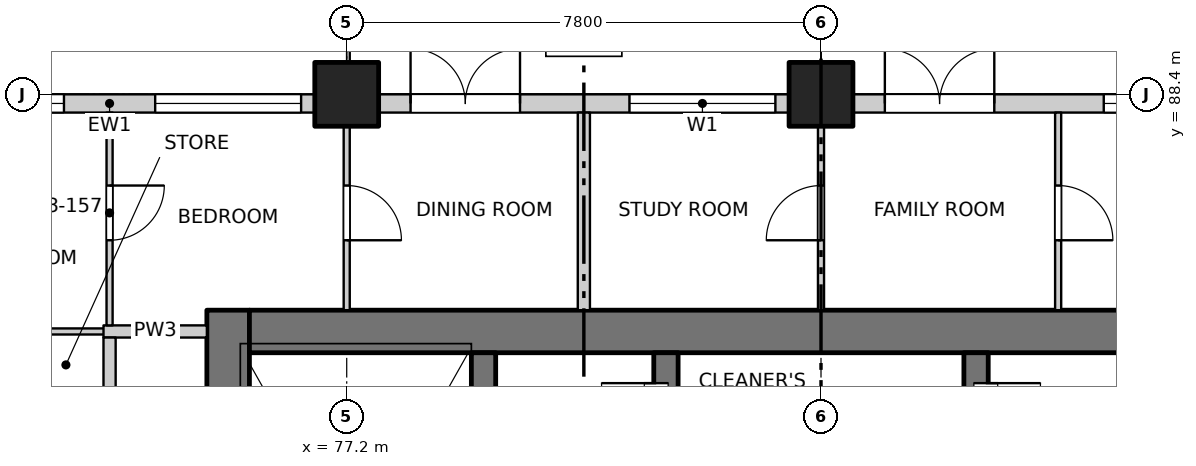
"""IFC4 building model, lengths in metres.
Left out: names, types, materials, properties, quantities, classifications, styles, units other than length and angle.
Written with IfcOpenShell. Run it as: python <this file> out.ifc"""

import sys

from ifc_helpers import new_model, si_unit, direction, frame, frame_2d, origin, origin_2d, place, context, subcontext, project, spatial, rectangle, extrude, element, fill, save


model = new_model("IFC4")
c1 = context("Model", 3, precision=1e-05, world=origin(), true_north=direction((0.0, 1.0)))
c2 = subcontext(c1, "Body", "Model", "MODEL_VIEW")
j1 = project(units=[si_unit("LENGTHUNIT", "METRE"), si_unit("PLANEANGLEUNIT", "RADIAN")], contexts=[c1])
p1 = place(None, origin())
s1 = spatial("IfcSite", under=j1, at=p1, CompositionType="ELEMENT")
p2 = place(p1, origin())
s2 = spatial("IfcBuilding", under=s1, at=p2, CompositionType="ELEMENT")
p3 = place(p2, frame((0.0, 0.0, 39.9)))
s3 = spatial("IfcBuildingStorey", under=s2, at=p3, CompositionType="ELEMENT", Elevation=39.9)
for number, where, z_axis, x_axis in (
    (1, (77.2, 88.4, -0.25), (0.0, 0.0, 1.0), (1.0, 0.0, 0.0)),
    (2, (85.0, 88.4, -0.25), (0.0, 0.0, 1.0), (1.0, 0.0, 0.0)),
):
    element("IfcColumn", number, at=place(p3, frame(where, z_axis=z_axis, x_axis=x_axis)), inside=s3, PredefinedType="COLUMN", context=c2, shape_type="SweptSolid", body=[
        extrude(rectangle(XDim=1.05, YDim=1.05, at=origin_2d()), origin(), (0.0, 0.0, 1.0), 3.4),
    ])
p4 = place(p3, frame((75.25, 77.3, -0.25), z_axis=(0.0, 0.0, 1.0), x_axis=(0.0, 1.0, 0.0)))
e3 = element("IfcWall", 3, at=p4, inside=s3, PredefinedType="SOLIDWALL", context=c2, shape_type="SweptSolid", body=[
    extrude(rectangle(XDim=7.55, YDim=0.7, at=frame_2d((3.775, 0.0))), origin(), (0.0, 0.0, 1.0), 3.4),
])
p5 = place(p4, frame((0.3, 0.0, 0.25)))
e4 = element("IfcOpeningElement", 4, at=p5, cuts=e3, PredefinedType="OPENING", context=c2, shape_type="SweptSolid", body=[
    extrude(rectangle(XDim=1.2, YDim=2.1, at=frame_2d((0.6, 1.05))), frame((0.0, 0.36, 0.0), z_axis=(0.0, -1.0, 0.0), x_axis=(1.0, 0.0, 0.0)), (0.0, 0.0, 1.0), 0.72),
])
p6 = place(p3, frame((75.6, 84.5, -0.25), z_axis=(0.0, 0.0, 1.0), x_axis=(1.0, 0.0, 0.0)))
e5 = element("IfcWall", 5, at=p6, inside=s3, PredefinedType="SOLIDWALL", context=c2, shape_type="SweptSolid", body=[
    extrude(rectangle(XDim=18.8, YDim=0.7, at=frame_2d((9.4, 0.0))), origin(), (0.0, 0.0, 1.0), 3.4),
])
p7 = place(p3, frame((79.45, 77.3, -0.25), z_axis=(0.0, 0.0, 1.0), x_axis=(0.0, 1.0, 0.0)))
e6 = element("IfcWall", 6, at=p7, inside=s3, PredefinedType="SOLIDWALL", context=c2, shape_type="SweptSolid", body=[
    extrude(rectangle(XDim=6.85, YDim=0.4, at=frame_2d((3.425, 0.0))), origin(), (0.0, 0.0, 1.0), 3.4),
])
p8 = place(p3, frame((82.45, 82.1, -0.25), z_axis=(0.0, 0.0, 1.0), x_axis=(0.0, 1.0, 0.0)))
e7 = element("IfcWall", 7, at=p8, inside=s3, PredefinedType="SOLIDWALL", context=c2, shape_type="SweptSolid", body=[
    extrude(rectangle(XDim=2.05, YDim=0.4, at=frame_2d((1.025, 0.0))), origin(), (0.0, 0.0, 1.0), 3.4),
])
p9 = place(p8, frame((0.65, 0.0, 0.25)))
e8 = element("IfcOpeningElement", 8, at=p9, cuts=e7, PredefinedType="OPENING", context=c2, shape_type="SweptSolid", body=[
    extrude(rectangle(XDim=0.9, YDim=2.1, at=frame_2d((0.45, 1.05))), frame((0.0, 0.21, 0.0), z_axis=(0.0, -1.0, 0.0), x_axis=(1.0, 0.0, 0.0)), (0.0, 0.0, 1.0), 0.42),
])
p10 = place(p3, frame((87.55, 82.1, -0.25), z_axis=(0.0, 0.0, 1.0), x_axis=(0.0, 1.0, 0.0)))
e9 = element("IfcWall", 9, at=p10, inside=s3, PredefinedType="SOLIDWALL", context=c2, shape_type="SweptSolid", body=[
    extrude(rectangle(XDim=2.05, YDim=0.4, at=frame_2d((1.025, 0.0))), origin(), (0.0, 0.0, 1.0), 3.4),
])
p11 = place(p10, frame((0.65, 0.0, 0.25)))
e10 = element("IfcOpeningElement", 10, at=p11, cuts=e9, PredefinedType="OPENING", context=c2, shape_type="SweptSolid", body=[
    extrude(rectangle(XDim=0.9, YDim=2.1, at=frame_2d((0.45, 1.05))), frame((0.0, 0.21, 0.0), z_axis=(0.0, -1.0, 0.0), x_axis=(1.0, 0.0, 0.0)), (0.0, 0.0, 1.0), 0.42),
])
p12 = place(p3, frame((69.925, 88.25, 0.0), z_axis=(0.0, 0.0, 1.0), x_axis=(1.0, 0.0, 0.0)))
e11 = element("IfcWall", 11, at=p12, inside=s3, PredefinedType="SOLIDWALL", context=c2, shape_type="SweptSolid", body=[
    extrude(rectangle(XDim=6.75, YDim=0.3, at=frame_2d((3.375, 0.0))), origin(), (0.0, 0.0, 1.0), 2.7),
])
p13 = place(p12, frame((0.225, 0.0, 0.9)))
e12 = element("IfcOpeningElement", 12, at=p13, cuts=e11, PredefinedType="OPENING", context=c2, shape_type="SweptSolid", body=[
    extrude(rectangle(XDim=2.4, YDim=1.8, at=frame_2d((1.2, 0.9))), frame((0.0, 0.16, 0.0), z_axis=(0.0, -1.0, 0.0), x_axis=(1.0, 0.0, 0.0)), (0.0, 0.0, 1.0), 0.32),
])
p14 = place(p12, frame((4.125, 0.0, 0.9)))
e13 = element("IfcOpeningElement", 13, at=p14, cuts=e11, PredefinedType="OPENING", context=c2, shape_type="SweptSolid", body=[
    extrude(rectangle(XDim=2.4, YDim=1.8, at=frame_2d((1.2, 0.9))), frame((0.0, 0.16, 0.0), z_axis=(0.0, -1.0, 0.0), x_axis=(1.0, 0.0, 0.0)), (0.0, 0.0, 1.0), 0.32),
])
p15 = place(p3, frame((77.725, 88.25, 0.0), z_axis=(0.0, 0.0, 1.0), x_axis=(1.0, 0.0, 0.0)))
e14 = element("IfcWall", 14, at=p15, inside=s3, PredefinedType="SOLIDWALL", context=c2, shape_type="SweptSolid", body=[
    extrude(rectangle(XDim=6.75, YDim=0.3, at=frame_2d((3.375, 0.0))), origin(), (0.0, 0.0, 1.0), 2.7),
])
p16 = place(p15, frame((0.525, 0.0, 0.0)))
e15 = element("IfcOpeningElement", 15, at=p16, cuts=e14, PredefinedType="OPENING", context=c2, shape_type="SweptSolid", body=[
    extrude(rectangle(XDim=1.8, YDim=2.4, at=frame_2d((0.9, 1.2))), frame((0.0, 0.16, 0.0), z_axis=(0.0, -1.0, 0.0), x_axis=(1.0, 0.0, 0.0)), (0.0, 0.0, 1.0), 0.32),
])
p17 = place(p15, frame((4.125, 0.0, 0.9)))
e16 = element("IfcOpeningElement", 16, at=p17, cuts=e14, PredefinedType="OPENING", context=c2, shape_type="SweptSolid", body=[
    extrude(rectangle(XDim=2.4, YDim=1.8, at=frame_2d((1.2, 0.9))), frame((0.0, 0.16, 0.0), z_axis=(0.0, -1.0, 0.0), x_axis=(1.0, 0.0, 0.0)), (0.0, 0.0, 1.0), 0.32),
])
p18 = place(p3, frame((85.525, 88.25, 0.0), z_axis=(0.0, 0.0, 1.0), x_axis=(1.0, 0.0, 0.0)))
e17 = element("IfcWall", 17, at=p18, inside=s3, PredefinedType="SOLIDWALL", context=c2, shape_type="SweptSolid", body=[
    extrude(rectangle(XDim=6.75, YDim=0.3, at=frame_2d((3.375, 0.0))), origin(), (0.0, 0.0, 1.0), 2.7),
])
p19 = place(p18, frame((0.525, 0.0, 0.0)))
e18 = element("IfcOpeningElement", 18, at=p19, cuts=e17, PredefinedType="OPENING", context=c2, shape_type="SweptSolid", body=[
    extrude(rectangle(XDim=1.8, YDim=2.4, at=frame_2d((0.9, 1.2))), frame((0.0, 0.16, 0.0), z_axis=(0.0, -1.0, 0.0), x_axis=(1.0, 0.0, 0.0)), (0.0, 0.0, 1.0), 0.32),
])
p20 = place(p18, frame((4.125, 0.0, 0.9)))
e19 = element("IfcOpeningElement", 19, at=p20, cuts=e17, PredefinedType="OPENING", context=c2, shape_type="SweptSolid", body=[
    extrude(rectangle(XDim=2.4, YDim=1.8, at=frame_2d((1.2, 0.9))), frame((0.0, 0.16, 0.0), z_axis=(0.0, -1.0, 0.0), x_axis=(1.0, 0.0, 0.0)), (0.0, 0.0, 1.0), 0.32),
])
p21 = place(p3, frame((61.9, 84.5, 0.0), z_axis=(0.0, 0.0, 1.0), x_axis=(1.0, 0.0, 0.0)))
e20 = element("IfcWall", 20, at=p21, inside=s3, PredefinedType="PARTITIONING", context=c2, shape_type="SweptSolid", body=[
    extrude(rectangle(XDim=11.5, YDim=0.1, at=frame_2d((5.75, 0.0))), origin(), (0.0, 0.0, 1.0), 3.15),
])
p22 = place(p21, frame((7.965, 0.0, 0.0)))
e21 = element("IfcOpeningElement", 21, at=p22, cuts=e20, PredefinedType="OPENING", context=c2, shape_type="SweptSolid", body=[
    extrude(rectangle(XDim=0.9, YDim=2.1, at=frame_2d((0.45, 1.05))), frame((0.0, 0.06, 0.0), z_axis=(0.0, -1.0, 0.0), x_axis=(1.0, 0.0, 0.0)), (0.0, 0.0, 1.0), 0.12),
])
p23 = place(p3, frame((73.2, 84.5, 0.0), z_axis=(0.0, 0.0, 1.0), x_axis=(1.0, 0.0, 0.0)))
e22 = element("IfcWall", 22, at=p23, inside=s3, PredefinedType="PARTITIONING", context=c2, shape_type="SweptSolid", body=[
    extrude(rectangle(XDim=1.7, YDim=0.2, at=frame_2d((0.85, 0.0))), origin(), (0.0, 0.0, 1.0), 3.15),
])
p24 = place(p3, frame((73.3, 53.4, 0.0), z_axis=(0.0, 0.0, 1.0), x_axis=(0.0, 1.0, 0.0)))
e23 = element("IfcWall", 23, at=p24, inside=s3, PredefinedType="PARTITIONING", context=c2, shape_type="SweptSolid", body=[
    extrude(rectangle(XDim=31.0, YDim=0.2, at=frame_2d((15.5, 0.0))), origin(), (0.0, 0.0, 1.0), 3.15),
])
p25 = place(p24, frame((5.775, 0.0, 0.0)))
e24 = element("IfcOpeningElement", 24, at=p25, cuts=e23, PredefinedType="OPENING", context=c2, shape_type="SweptSolid", body=[
    extrude(rectangle(XDim=1.0, YDim=2.1, at=frame_2d((0.5, 1.05))), frame((0.0, 0.11, 0.0), z_axis=(0.0, -1.0, 0.0), x_axis=(1.0, 0.0, 0.0)), (0.0, 0.0, 1.0), 0.22),
])
p26 = place(p24, frame((10.875, 0.0, 0.0)))
e25 = element("IfcOpeningElement", 25, at=p26, cuts=e23, PredefinedType="OPENING", context=c2, shape_type="SweptSolid", body=[
    extrude(rectangle(XDim=1.0, YDim=2.1, at=frame_2d((0.5, 1.05))), frame((0.0, 0.11, 0.0), z_axis=(0.0, -1.0, 0.0), x_axis=(1.0, 0.0, 0.0)), (0.0, 0.0, 1.0), 0.22),
])
p27 = place(p24, frame((18.025, 0.0, 0.0)))
e26 = element("IfcOpeningElement", 26, at=p27, cuts=e23, PredefinedType="OPENING", context=c2, shape_type="SweptSolid", body=[
    extrude(rectangle(XDim=1.0, YDim=2.1, at=frame_2d((0.5, 1.05))), frame((0.0, 0.11, 0.0), z_axis=(0.0, -1.0, 0.0), x_axis=(1.0, 0.0, 0.0)), (0.0, 0.0, 1.0), 0.22),
])
p28 = place(p24, frame((27.725, 0.0, 0.0)))
e27 = element("IfcOpeningElement", 27, at=p28, cuts=e23, PredefinedType="OPENING", context=c2, shape_type="SweptSolid", body=[
    extrude(rectangle(XDim=1.0, YDim=2.1, at=frame_2d((0.5, 1.05))), frame((0.0, 0.11, 0.0), z_axis=(0.0, -1.0, 0.0), x_axis=(1.0, 0.0, 0.0)), (0.0, 0.0, 1.0), 0.22),
])
p29 = place(p3, frame((73.3, 84.6, 0.0), z_axis=(0.0, 0.0, 1.0), x_axis=(0.0, 1.0, 0.0)))
e28 = element("IfcWall", 28, at=p29, inside=s3, PredefinedType="PARTITIONING", context=c2, shape_type="SweptSolid", body=[
    extrude(rectangle(XDim=3.5, YDim=0.1, at=frame_2d((1.75, 0.0))), origin(), (0.0, 0.0, 1.0), 3.15),
])
p30 = place(p29, frame((1.4, 0.0, 0.0)))
e29 = element("IfcOpeningElement", 29, at=p30, cuts=e28, PredefinedType="OPENING", context=c2, shape_type="SweptSolid", body=[
    extrude(rectangle(XDim=0.9, YDim=2.1, at=frame_2d((0.45, 1.05))), frame((0.0, 0.06, 0.0), z_axis=(0.0, -1.0, 0.0), x_axis=(1.0, 0.0, 0.0)), (0.0, 0.0, 1.0), 0.12),
])
p31 = place(p3, frame((77.2, 84.85, 0.0), z_axis=(0.0, 0.0, 1.0), x_axis=(0.0, 1.0, 0.0)))
e30 = element("IfcWall", 30, at=p31, inside=s3, PredefinedType="PARTITIONING", context=c2, shape_type="SweptSolid", body=[
    extrude(rectangle(XDim=3.25, YDim=0.1, at=frame_2d((1.625, 0.0))), origin(), (0.0, 0.0, 1.0), 3.15),
])
p32 = place(p31, frame((1.15, 0.0, 0.0)))
e31 = element("IfcOpeningElement", 31, at=p32, cuts=e30, PredefinedType="OPENING", context=c2, shape_type="SweptSolid", body=[
    extrude(rectangle(XDim=0.9, YDim=2.1, at=frame_2d((0.45, 1.05))), frame((0.0, 0.06, 0.0), z_axis=(0.0, -1.0, 0.0), x_axis=(1.0, 0.0, 0.0)), (0.0, 0.0, 1.0), 0.12),
])
p33 = place(p3, frame((81.1, 84.85, 0.0), z_axis=(0.0, 0.0, 1.0), x_axis=(0.0, 1.0, 0.0)))
e32 = element("IfcWall", 32, at=p33, inside=s3, PredefinedType="PARTITIONING", context=c2, shape_type="SweptSolid", body=[
    extrude(rectangle(XDim=3.25, YDim=0.2, at=frame_2d((1.625, 0.0))), origin(), (0.0, 0.0, 1.0), 3.15),
])
p34 = place(p3, frame((85.0, 84.85, 0.0), z_axis=(0.0, 0.0, 1.0), x_axis=(0.0, 1.0, 0.0)))
e33 = element("IfcWall", 33, at=p34, inside=s3, PredefinedType="PARTITIONING", context=c2, shape_type="SweptSolid", body=[
    extrude(rectangle(XDim=3.25, YDim=0.1, at=frame_2d((1.625, 0.0))), origin(), (0.0, 0.0, 1.0), 3.15),
])
p35 = place(p34, frame((1.15, 0.0, 0.0)))
e34 = element("IfcOpeningElement", 34, at=p35, cuts=e33, PredefinedType="OPENING", context=c2, shape_type="SweptSolid", body=[
    extrude(rectangle(XDim=0.9, YDim=2.1, at=frame_2d((0.45, 1.05))), frame((0.0, 0.06, 0.0), z_axis=(0.0, -1.0, 0.0), x_axis=(1.0, 0.0, 0.0)), (0.0, 0.0, 1.0), 0.12),
])
p36 = place(p3, frame((88.9, 84.85, 0.0), z_axis=(0.0, 0.0, 1.0), x_axis=(0.0, 1.0, 0.0)))
e35 = element("IfcWall", 35, at=p36, inside=s3, PredefinedType="PARTITIONING", context=c2, shape_type="SweptSolid", body=[
    extrude(rectangle(XDim=3.25, YDim=0.1, at=frame_2d((1.625, 0.0))), origin(), (0.0, 0.0, 1.0), 3.15),
])
p37 = place(p36, frame((1.15, 0.0, 0.0)))
e36 = element("IfcOpeningElement", 36, at=p37, cuts=e35, PredefinedType="OPENING", context=c2, shape_type="SweptSolid", body=[
    extrude(rectangle(XDim=0.9, YDim=2.1, at=frame_2d((0.45, 1.05))), frame((0.0, 0.06, 0.0), z_axis=(0.0, -1.0, 0.0), x_axis=(1.0, 0.0, 0.0)), (0.0, 0.0, 1.0), 0.12),
])
p38 = place(p13, origin())
e37 = element("IfcWindow", 37, at=p38, inside=s3, PartitioningType="DOUBLE_PANEL_VERTICAL", PredefinedType="WINDOW", context=c2, shape_type="SweptSolid", body=[
    extrude(rectangle(XDim=2.4, YDim=1.8, at=frame_2d((1.2, 0.9))), frame((0.0, 0.03, 0.0), z_axis=(0.0, -1.0, 0.0), x_axis=(1.0, 0.0, 0.0)), (0.0, 0.0, 1.0), 0.06),
])
fill(e12, e37)
p39 = place(p14, origin())
e38 = element("IfcWindow", 38, at=p39, inside=s3, PartitioningType="DOUBLE_PANEL_VERTICAL", PredefinedType="WINDOW", context=c2, shape_type="SweptSolid", body=[
    extrude(rectangle(XDim=2.4, YDim=1.8, at=frame_2d((1.2, 0.9))), frame((0.0, 0.03, 0.0), z_axis=(0.0, -1.0, 0.0), x_axis=(1.0, 0.0, 0.0)), (0.0, 0.0, 1.0), 0.06),
])
fill(e13, e38)
p40 = place(p16, origin())
e39 = element("IfcDoor", 39, at=p40, inside=s3, OperationType="DOUBLE_DOOR_SINGLE_SWING", PredefinedType="DOOR", context=c2, shape_type="SweptSolid", body=[
    extrude(rectangle(XDim=1.8, YDim=2.4, at=frame_2d((0.9, 1.2))), frame((0.0, 0.025, 0.0), z_axis=(0.0, -1.0, 0.0), x_axis=(1.0, 0.0, 0.0)), (0.0, 0.0, 1.0), 0.05),
])
fill(e15, e39)
p41 = place(p17, origin())
e40 = element("IfcWindow", 40, at=p41, inside=s3, PartitioningType="DOUBLE_PANEL_VERTICAL", PredefinedType="WINDOW", context=c2, shape_type="SweptSolid", body=[
    extrude(rectangle(XDim=2.4, YDim=1.8, at=frame_2d((1.2, 0.9))), frame((0.0, 0.03, 0.0), z_axis=(0.0, -1.0, 0.0), x_axis=(1.0, 0.0, 0.0)), (0.0, 0.0, 1.0), 0.06),
])
fill(e16, e40)
p42 = place(p19, origin())
e41 = element("IfcDoor", 41, at=p42, inside=s3, OperationType="DOUBLE_DOOR_SINGLE_SWING", PredefinedType="DOOR", context=c2, shape_type="SweptSolid", body=[
    extrude(rectangle(XDim=1.8, YDim=2.4, at=frame_2d((0.9, 1.2))), frame((0.0, 0.025, 0.0), z_axis=(0.0, -1.0, 0.0), x_axis=(1.0, 0.0, 0.0)), (0.0, 0.0, 1.0), 0.05),
])
fill(e18, e41)
p43 = place(p20, origin())
e42 = element("IfcWindow", 42, at=p43, inside=s3, PartitioningType="DOUBLE_PANEL_VERTICAL", PredefinedType="WINDOW", context=c2, shape_type="SweptSolid", body=[
    extrude(rectangle(XDim=2.4, YDim=1.8, at=frame_2d((1.2, 0.9))), frame((0.0, 0.03, 0.0), z_axis=(0.0, -1.0, 0.0), x_axis=(1.0, 0.0, 0.0)), (0.0, 0.0, 1.0), 0.06),
])
fill(e19, e42)
p44 = place(p9, origin())
e43 = element("IfcDoor", 43, at=p44, inside=s3, OperationType="SINGLE_SWING_RIGHT", PredefinedType="DOOR", context=c2, shape_type="SweptSolid", body=[
    extrude(rectangle(XDim=0.9, YDim=2.1, at=frame_2d((0.45, 1.05))), frame((0.0, 0.185, 0.0), z_axis=(0.0, -1.0, 0.0), x_axis=(1.0, 0.0, 0.0)), (0.0, 0.0, 1.0), 0.05),
])
fill(e8, e43)
p45 = place(p11, origin())
e44 = element("IfcDoor", 44, at=p45, inside=s3, OperationType="SINGLE_SWING_LEFT", PredefinedType="DOOR", context=c2, shape_type="SweptSolid", body=[
    extrude(rectangle(XDim=0.9, YDim=2.1, at=frame_2d((0.45, 1.05))), frame((0.0, -0.135, 0.0), z_axis=(0.0, -1.0, 0.0), x_axis=(1.0, 0.0, 0.0)), (0.0, 0.0, 1.0), 0.05),
])
fill(e10, e44)
p46 = place(p30, origin())
e45 = element("IfcDoor", 45, at=p46, inside=s3, OperationType="SINGLE_SWING_LEFT", PredefinedType="DOOR", context=c2, shape_type="SweptSolid", body=[
    extrude(rectangle(XDim=0.9, YDim=2.1, at=frame_2d((0.45, 1.05))), frame((0.0, 0.025, 0.0), z_axis=(0.0, -1.0, 0.0), x_axis=(1.0, 0.0, 0.0)), (0.0, 0.0, 1.0), 0.05),
])
fill(e29, e45)
p47 = place(p32, origin())
e46 = element("IfcDoor", 46, at=p47, inside=s3, OperationType="SINGLE_SWING_RIGHT", PredefinedType="DOOR", context=c2, shape_type="SweptSolid", body=[
    extrude(rectangle(XDim=0.9, YDim=2.1, at=frame_2d((0.45, 1.05))), frame((0.0, 0.025, 0.0), z_axis=(0.0, -1.0, 0.0), x_axis=(1.0, 0.0, 0.0)), (0.0, 0.0, 1.0), 0.05),
])
fill(e31, e46)
p48 = place(p35, origin())
e47 = element("IfcDoor", 47, at=p48, inside=s3, OperationType="SINGLE_SWING_LEFT", PredefinedType="DOOR", context=c2, shape_type="SweptSolid", body=[
    extrude(rectangle(XDim=0.9, YDim=2.1, at=frame_2d((0.45, 1.05))), frame((0.0, 0.025, 0.0), z_axis=(0.0, -1.0, 0.0), x_axis=(1.0, 0.0, 0.0)), (0.0, 0.0, 1.0), 0.05),
])
fill(e34, e47)
p49 = place(p37, origin())
e48 = element("IfcDoor", 48, at=p49, inside=s3, OperationType="SINGLE_SWING_RIGHT", PredefinedType="DOOR", context=c2, shape_type="SweptSolid", body=[
    extrude(rectangle(XDim=0.9, YDim=2.1, at=frame_2d((0.45, 1.05))), frame((0.0, 0.025, 0.0), z_axis=(0.0, -1.0, 0.0), x_axis=(1.0, 0.0, 0.0)), (0.0, 0.0, 1.0), 0.05),
])
fill(e36, e48)
save(model, sys.argv[1])
